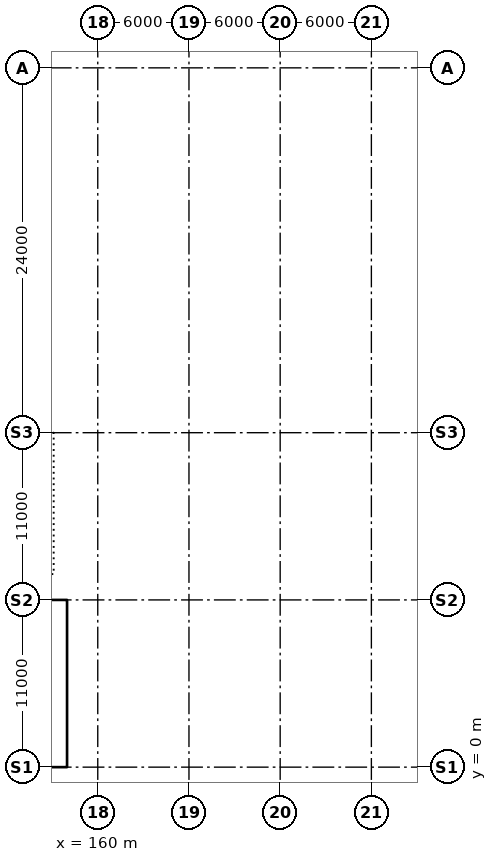
"""IFC4 building model, lengths in metres.
Left out: names, types, materials, properties, quantities, classifications, styles, units other than length and angle.
Written with IfcOpenShell. Run it as: python <this file> out.ifc"""

import sys

from ifc_helpers import new_model, si_unit, direction, frame, origin, origin_2d, place, context, subcontext, project, spatial, rectangle, extrude, element, save


model = new_model("IFC4")
c1 = context("Model", 3, precision=1e-05, world=origin(), true_north=direction((0.0, 1.0)))
c2 = subcontext(c1, "Body", "Model", "MODEL_VIEW")
j1 = project(units=[si_unit("LENGTHUNIT", "METRE"), si_unit("PLANEANGLEUNIT", "RADIAN")], contexts=[c1])
p1 = place(None, origin())
s1 = spatial("IfcSite", under=j1, at=p1, CompositionType="ELEMENT")
p2 = place(p1, origin())
s2 = spatial("IfcBuilding", under=s1, at=p2, CompositionType="ELEMENT")
p3 = place(p2, origin())
s3 = spatial("IfcBuildingStorey", under=s2, at=p3, CompositionType="ELEMENT", Elevation=0.0)
for number, where, z_axis, x_axis in (
    (1, (157.58, 0.4, -0.3), (0.0, 0.0, 1.0), (1.0, 0.0, 0.0)),
    (2, (157.58, 10.6, -0.3), (0.0, 0.0, 1.0), (1.0, 0.0, 0.0)),
):
    element("IfcColumn", number, at=place(p3, frame(where, z_axis=z_axis, x_axis=x_axis)), inside=s3, PredefinedType="COLUMN", context=c2, shape_type="SweptSolid", body=[
        extrude(rectangle(XDim=0.8, YDim=0.8, at=origin_2d()), origin(), (0.0, 0.0, 1.0), 5.3),
    ])
p4 = place(p3, frame((157.58, 22.5, -0.3), z_axis=(0.0, 0.0, 1.0), x_axis=(1.0, 0.0, 0.0)))
e3 = element("IfcColumn", 3, at=p4, inside=s3, PredefinedType="COLUMN", context=c2, shape_type="SweptSolid", body=[
    extrude(rectangle(XDim=0.8, YDim=1.0, at=origin_2d()), origin(), (0.0, 0.0, 1.0), 5.3),
])
p5 = place(p3, frame((157.58, 33.7, -0.3), z_axis=(0.0, 0.0, 1.0), x_axis=(1.0, 0.0, 0.0)))
e4 = element("IfcColumn", 4, at=p5, inside=s3, PredefinedType="COLUMN", context=c2, shape_type="SweptSolid", body=[
    extrude(rectangle(XDim=0.8, YDim=1.2, at=origin_2d()), origin(), (0.0, 0.0, 1.0), 5.3),
])
p6 = place(p3, frame((157.58, 44.9, -0.3), z_axis=(0.0, 0.0, 1.0), x_axis=(1.0, 0.0, 0.0)))
e5 = element("IfcColumn", 5, at=p6, inside=s3, PredefinedType="COLUMN", context=c2, shape_type="SweptSolid", body=[
    extrude(rectangle(XDim=0.8, YDim=1.0, at=origin_2d()), origin(), (0.0, 0.0, 1.0), 5.3),
])
for number, where, z_axis, x_axis in (
    (6, (158.5, 0.45, -0.3), (0.0, 0.0, 1.0), (1.0, 0.0, 0.0)),
    (7, (158.5, 11.7, -0.3), (0.0, 0.0, 1.0), (1.0, 0.0, 0.0)),
    (8, (158.5, 23.0, -0.3), (0.0, 0.0, 1.0), (1.0, 0.0, 0.0)),
    (9, (158.5, 34.3, -0.3), (0.0, 0.0, 1.0), (1.0, 0.0, 0.0)),
    (10, (158.5, 45.55, -0.3), (0.0, 0.0, 1.0), (1.0, 0.0, 0.0)),
    (11, (169.0, 0.45, -0.3), (0.0, 0.0, 1.0), (1.0, 0.0, 0.0)),
):
    element("IfcColumn", number, at=place(p3, frame(where, z_axis=z_axis, x_axis=x_axis)), inside=s3, PredefinedType="COLUMN", context=c2, shape_type="SweptSolid", body=[
        extrude(rectangle(XDim=0.9, YDim=0.9, at=origin_2d()), origin(), (0.0, 0.0, 1.0), 5.3),
    ])
for number, where, z_axis, x_axis in (
    (12, (169.0, 11.7, -0.3), (0.0, 0.0, 1.0), (1.0, 0.0, 0.0)),
    (13, (169.0, 23.0, -0.3), (0.0, 0.0, 1.0), (1.0, 0.0, 0.0)),
    (14, (169.0, 34.3, -0.3), (0.0, 0.0, 1.0), (1.0, 0.0, 0.0)),
):
    element("IfcColumn", number, at=place(p3, frame(where, z_axis=z_axis, x_axis=x_axis)), inside=s3, PredefinedType="COLUMN", context=c2, shape_type="SweptSolid", body=[
        extrude(rectangle(XDim=1.1, YDim=1.1, at=origin_2d()), origin(), (0.0, 0.0, 1.0), 5.3),
    ])
for number, where, z_axis, x_axis in (
    (15, (169.0, 45.55, -0.3), (0.0, 0.0, 1.0), (1.0, 0.0, 0.0)),
    (16, (179.5, 0.45, -0.3), (0.0, 0.0, 1.0), (1.0, 0.0, 0.0)),
    (17, (179.5, 11.7, -0.3), (0.0, 0.0, 1.0), (1.0, 0.0, 0.0)),
    (18, (179.5, 23.0, -0.3), (0.0, 0.0, 1.0), (1.0, 0.0, 0.0)),
    (19, (179.5, 34.3, -0.3), (0.0, 0.0, 1.0), (1.0, 0.0, 0.0)),
    (20, (179.5, 45.55, -0.3), (0.0, 0.0, 1.0), (1.0, 0.0, 0.0)),
):
    element("IfcColumn", number, at=place(p3, frame(where, z_axis=z_axis, x_axis=x_axis)), inside=s3, PredefinedType="COLUMN", context=c2, shape_type="SweptSolid", body=[
        extrude(rectangle(XDim=0.9, YDim=0.9, at=origin_2d()), origin(), (0.0, 0.0, 1.0), 5.3),
    ])
save(model, sys.argv[1])
